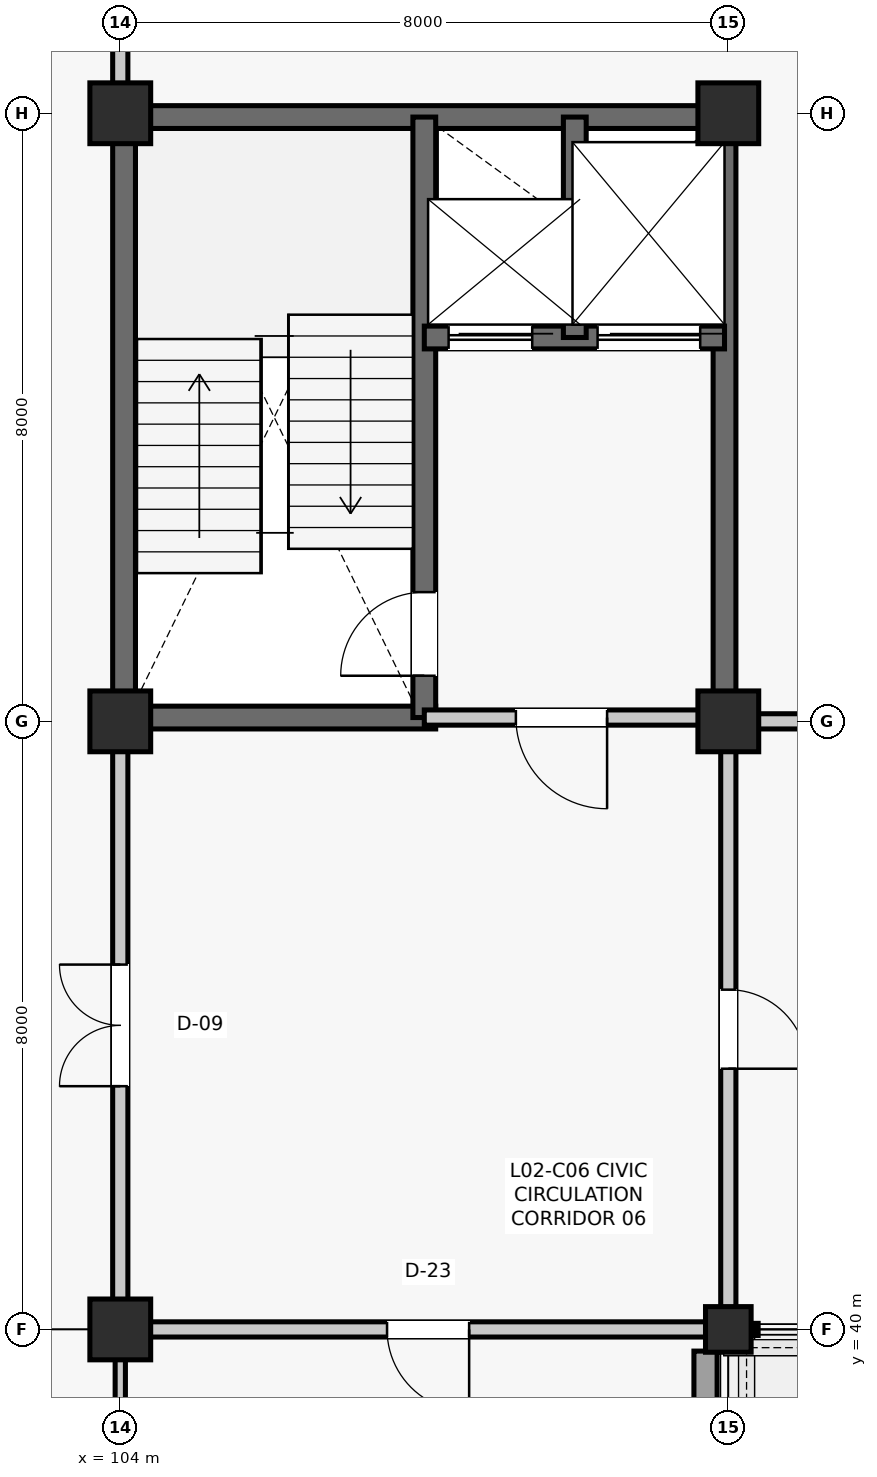
"""IFC4 building model, lengths in metres.
Left out: names, types, materials, properties, quantities, classifications, styles, units other than length and angle.
Written with IfcOpenShell. Run it as: python <this file> out.ifc"""

import sys

from ifc_helpers import new_model, si_unit, direction, frame, frame_2d, origin, origin_2d, place, context, subcontext, project, spatial, rectangle, extrude, element, fill, save


model = new_model("IFC4")
c1 = context("Model", 3, precision=1e-05, world=origin(), true_north=direction((0.0, 1.0)))
c2 = subcontext(c1, "Body", "Model", "MODEL_VIEW")
j1 = project(units=[si_unit("LENGTHUNIT", "METRE"), si_unit("PLANEANGLEUNIT", "RADIAN")], contexts=[c1])
p1 = place(None, origin())
s1 = spatial("IfcSite", under=j1, at=p1, CompositionType="ELEMENT")
p2 = place(p1, origin())
s2 = spatial("IfcBuilding", under=s1, at=p2, CompositionType="ELEMENT")
p3 = place(p2, frame((0.0, 0.0, 9.9)))
s3 = spatial("IfcBuildingStorey", under=s2, at=p3, CompositionType="ELEMENT", Elevation=9.9)
for number, where, z_axis, x_axis in (
    (1, (104.0, 40.0, 0.0), (0.0, 0.0, 1.0), (1.0, 0.0, 0.0)),
    (2, (104.0, 48.0, 0.0), (0.0, 0.0, 1.0), (1.0, 0.0, 0.0)),
    (3, (104.0, 56.0, 0.0), (0.0, 0.0, 1.0), (1.0, 0.0, 0.0)),
):
    element("IfcColumn", number, at=place(p3, frame(where, z_axis=z_axis, x_axis=x_axis)), inside=s3, PredefinedType="COLUMN", context=c2, shape_type="SweptSolid", body=[
        extrude(rectangle(XDim=0.8, YDim=0.8, at=origin_2d()), origin(), (0.0, 0.0, 1.0), 3.96),
    ])
p4 = place(p3, frame((112.0, 40.0, 0.0), z_axis=(0.0, 0.0, 1.0), x_axis=(1.0, 0.0, 0.0)))
e4 = element("IfcColumn", 4, at=p4, inside=s3, PredefinedType="COLUMN", context=c2, shape_type="SweptSolid", body=[
    extrude(rectangle(XDim=0.6, YDim=0.6, at=origin_2d()), origin(), (0.0, 0.0, 1.0), 3.96),
])
for number, where, z_axis, x_axis in (
    (5, (112.0, 48.0, 0.0), (0.0, 0.0, 1.0), (1.0, 0.0, 0.0)),
    (6, (112.0, 56.0, 0.0), (0.0, 0.0, 1.0), (1.0, 0.0, 0.0)),
):
    element("IfcColumn", number, at=place(p3, frame(where, z_axis=z_axis, x_axis=x_axis)), inside=s3, PredefinedType="COLUMN", context=c2, shape_type="SweptSolid", body=[
        extrude(rectangle(XDim=0.8, YDim=0.8, at=origin_2d()), origin(), (0.0, 0.0, 1.0), 3.96),
    ])
p5 = place(p3, frame((111.7, 32.285, 0.0), z_axis=(0.0, 0.0, 1.0), x_axis=(0.0, 1.0, 0.0)))
e7 = element("IfcWall", 7, at=p5, inside=s3, PredefinedType="SOLIDWALL", context=c2, shape_type="SweptSolid", body=[
    extrude(rectangle(XDim=7.43, YDim=0.305, at=frame_2d((3.715, 0.0))), origin(), (0.0, 0.0, 1.0), 3.28),
])
for number, where, z_axis, x_axis in (
    (8, (104.05, 48.29, 0.0), (0.0, 0.0, 1.0), (0.0, 1.0, 0.0)),
    (9, (104.29, 55.95, 0.0), (0.0, 0.0, 1.0), (1.0, 0.0, 0.0)),
    (10, (111.95, 48.29, 0.0), (0.0, 0.0, 1.0), (0.0, 1.0, 0.0)),
):
    element("IfcWall", number, at=place(p3, frame(where, z_axis=z_axis, x_axis=x_axis)), inside=s3, PredefinedType="SHEAR", context=c2, shape_type="SweptSolid", body=[
        extrude(rectangle(XDim=7.42, YDim=0.3, at=frame_2d((3.71, 0.0))), origin(), (0.0, 0.0, 1.0), 3.705),
    ])
p6 = place(p3, frame((104.29, 48.05, 0.0), z_axis=(0.0, 0.0, 1.0), x_axis=(1.0, 0.0, 0.0)))
e11 = element("IfcWall", 11, at=p6, inside=s3, PredefinedType="SHEAR", context=c2, shape_type="SweptSolid", body=[
    extrude(rectangle(XDim=3.86, YDim=0.3, at=frame_2d((1.93, 0.0))), origin(), (0.0, 0.0, 1.0), 3.705),
])
p7 = place(p3, frame((108.0, 48.05, 0.0), z_axis=(0.0, 0.0, 1.0), x_axis=(0.0, 1.0, 0.0)))
e12 = element("IfcWall", 12, at=p7, inside=s3, PredefinedType="SHEAR", context=c2, shape_type="SweptSolid", body=[
    extrude(rectangle(XDim=7.9, YDim=0.3, at=frame_2d((3.95, 0.0))), origin(), (0.0, 0.0, 1.0), 3.705),
])
p8 = place(p7, frame((0.55, 0.0, 0.0)))
e13 = element("IfcOpeningElement", 13, at=p8, cuts=e12, PredefinedType="OPENING", context=c2, shape_type="SweptSolid", body=[
    extrude(rectangle(XDim=1.1, YDim=2.15, at=frame_2d((0.55, 1.075))), frame((0.0, 0.16, 0.0), z_axis=(0.0, -1.0, 0.0), x_axis=(1.0, 0.0, 0.0)), (0.0, 0.0, 1.0), 0.32),
])
p9 = place(p3, frame((108.0, 53.05, 0.0), z_axis=(0.0, 0.0, 1.0), x_axis=(1.0, 0.0, 0.0)))
e14 = element("IfcWall", 14, at=p9, inside=s3, PredefinedType="SHEAR", context=c2, shape_type="SweptSolid", body=[
    extrude(rectangle(XDim=3.95, YDim=0.3, at=frame_2d((1.975, 0.0))), origin(), (0.0, 0.0, 1.0), 3.705),
])
p10 = place(p9, frame((0.32, 0.0, 0.0)))
e15 = element("IfcOpeningElement", 15, at=p10, cuts=e14, PredefinedType="OPENING", context=c2, shape_type="SweptSolid", body=[
    extrude(rectangle(XDim=1.1, YDim=2.2, at=frame_2d((0.55, 1.1))), frame((0.0, 0.16, 0.0), z_axis=(0.0, -1.0, 0.0), x_axis=(1.0, 0.0, 0.0)), (0.0, 0.0, 1.0), 0.32),
])
p11 = place(p9, frame((2.28, 0.0, 0.0)))
e16 = element("IfcOpeningElement", 16, at=p11, cuts=e14, PredefinedType="OPENING", context=c2, shape_type="SweptSolid", body=[
    extrude(rectangle(XDim=1.35, YDim=2.3, at=frame_2d((0.675, 1.15))), frame((0.0, 0.16, 0.0), z_axis=(0.0, -1.0, 0.0), x_axis=(1.0, 0.0, 0.0)), (0.0, 0.0, 1.0), 0.32),
])
p12 = place(p3, frame((109.98, 53.05, 0.0), z_axis=(0.0, 0.0, 1.0), x_axis=(0.0, 1.0, 0.0)))
e17 = element("IfcWall", 17, at=p12, inside=s3, PredefinedType="SHEAR", context=c2, shape_type="SweptSolid", body=[
    extrude(rectangle(XDim=2.9, YDim=0.3, at=frame_2d((1.45, 0.0))), origin(), (0.0, 0.0, 1.0), 3.705),
])
p13 = place(p3, frame((108.0, 48.05, 0.0), z_axis=(0.0, 0.0, 1.0), x_axis=(1.0, 0.0, 0.0)))
e18 = element("IfcWall", 18, at=p13, inside=s3, PredefinedType="PARTITIONING", context=c2, shape_type="SweptSolid", body=[
    extrude(rectangle(XDim=3.61, YDim=0.2, at=frame_2d((1.805, 0.0))), origin(), (0.0, 0.0, 1.0), 3.151),
])
p14 = place(p13, frame((1.205, 0.0, 0.0)))
e19 = element("IfcOpeningElement", 19, at=p14, cuts=e18, PredefinedType="OPENING", context=c2, shape_type="SweptSolid", body=[
    extrude(rectangle(XDim=1.2, YDim=2.15, at=frame_2d((0.6, 1.075))), frame((0.0, 0.11, 0.0), z_axis=(0.0, -1.0, 0.0), x_axis=(1.0, 0.0, 0.0)), (0.0, 0.0, 1.0), 0.22),
])
p15 = place(p3, frame((104.0, 32.39, 0.0), z_axis=(0.0, 0.0, 1.0), x_axis=(0.0, 1.0, 0.0)))
e20 = element("IfcWall", 20, at=p15, inside=s3, PredefinedType="PARTITIONING", context=c2, shape_type="SweptSolid", body=[
    extrude(rectangle(XDim=7.22, YDim=0.135, at=frame_2d((3.61, 0.0))), origin(), (0.0, 0.0, 1.0), 3.227),
])
p16 = place(p3, frame((104.0, 40.39, 0.0), z_axis=(0.0, 0.0, 1.0), x_axis=(0.0, 1.0, 0.0)))
e21 = element("IfcWall", 21, at=p16, inside=s3, PredefinedType="PARTITIONING", context=c2, shape_type="SweptSolid", body=[
    extrude(rectangle(XDim=7.22, YDim=0.2, at=frame_2d((3.61, 0.0))), origin(), (0.0, 0.0, 1.0), 3.151),
])
p17 = place(p16, frame((2.81, 0.0, 0.0)))
e22 = element("IfcOpeningElement", 22, at=p17, cuts=e21, PredefinedType="OPENING", context=c2, shape_type="SweptSolid", body=[
    extrude(rectangle(XDim=1.6, YDim=2.25, at=frame_2d((0.8, 1.125))), frame((0.0, 0.11, 0.0), z_axis=(0.0, -1.0, 0.0), x_axis=(1.0, 0.0, 0.0)), (0.0, 0.0, 1.0), 0.22),
])
p18 = place(p3, frame((104.0, 56.39, 0.0), z_axis=(0.0, 0.0, 1.0), x_axis=(0.0, 1.0, 0.0)))
e23 = element("IfcWall", 23, at=p18, inside=s3, PredefinedType="PARTITIONING", context=c2, shape_type="SweptSolid", body=[
    extrude(rectangle(XDim=7.22, YDim=0.2, at=frame_2d((3.61, 0.0))), origin(), (0.0, 0.0, 1.0), 3.157),
])
p19 = place(p18, frame((2.66, 0.0, 0.0)))
e24 = element("IfcOpeningElement", 24, at=p19, cuts=e23, PredefinedType="OPENING", context=c2, shape_type="SweptSolid", body=[
    extrude(rectangle(XDim=1.9, YDim=2.38, at=frame_2d((0.95, 1.19))), frame((0.0, 0.11, 0.0), z_axis=(0.0, -1.0, 0.0), x_axis=(1.0, 0.0, 0.0)), (0.0, 0.0, 1.0), 0.22),
])
p20 = place(p3, frame((104.39, 40.0, 0.0), z_axis=(0.0, 0.0, 1.0), x_axis=(1.0, 0.0, 0.0)))
e25 = element("IfcWall", 25, at=p20, inside=s3, PredefinedType="PARTITIONING", context=c2, shape_type="SweptSolid", body=[
    extrude(rectangle(XDim=7.32, YDim=0.2, at=frame_2d((3.66, 0.0))), origin(), (0.0, 0.0, 1.0), 3.141),
])
p21 = place(p20, frame((3.12, 0.0, 0.0)))
e26 = element("IfcOpeningElement", 26, at=p21, cuts=e25, PredefinedType="OPENING", context=c2, shape_type="SweptSolid", body=[
    extrude(rectangle(XDim=1.08, YDim=2.2, at=frame_2d((0.54, 1.1))), frame((0.0, 0.11, 0.0), z_axis=(0.0, -1.0, 0.0), x_axis=(1.0, 0.0, 0.0)), (0.0, 0.0, 1.0), 0.22),
])
p22 = place(p3, frame((112.0, 40.29, 0.0), z_axis=(0.0, 0.0, 1.0), x_axis=(0.0, 1.0, 0.0)))
e27 = element("IfcWall", 27, at=p22, inside=s3, PredefinedType="PARTITIONING", context=c2, shape_type="SweptSolid", body=[
    extrude(rectangle(XDim=7.32, YDim=0.2, at=frame_2d((3.66, 0.0))), origin(), (0.0, 0.0, 1.0), 3.221),
])
p23 = place(p22, frame((3.14, 0.0, 0.0)))
e28 = element("IfcOpeningElement", 28, at=p23, cuts=e27, PredefinedType="OPENING", context=c2, shape_type="SweptSolid", body=[
    extrude(rectangle(XDim=1.04, YDim=2.18, at=frame_2d((0.52, 1.09))), frame((0.0, 0.11, 0.0), z_axis=(0.0, -1.0, 0.0), x_axis=(1.0, 0.0, 0.0)), (0.0, 0.0, 1.0), 0.22),
])
p24 = place(p3, frame((112.39, 48.0, 0.0), z_axis=(0.0, 0.0, 1.0), x_axis=(1.0, 0.0, 0.0)))
e29 = element("IfcWall", 29, at=p24, inside=s3, PredefinedType="PARTITIONING", context=c2, shape_type="SweptSolid", body=[
    extrude(rectangle(XDim=7.32, YDim=0.2, at=frame_2d((3.66, 0.0))), origin(), (0.0, 0.0, 1.0), 3.082),
])
p25 = place(p24, frame((1.27, 0.0, 0.0)))
e30 = element("IfcOpeningElement", 30, at=p25, cuts=e29, PredefinedType="OPENING", context=c2, shape_type="SweptSolid", body=[
    extrude(rectangle(XDim=1.12, YDim=2.22, at=frame_2d((0.56, 1.11))), frame((0.0, 0.11, 0.0), z_axis=(0.0, -1.0, 0.0), x_axis=(1.0, 0.0, 0.0)), (0.0, 0.0, 1.0), 0.22),
])
p26 = place(p24, frame((5.296, 0.0, 0.0)))
e31 = element("IfcOpeningElement", 31, at=p26, cuts=e29, PredefinedType="OPENING", context=c2, shape_type="SweptSolid", body=[
    extrude(rectangle(XDim=1.12, YDim=2.22, at=frame_2d((0.56, 1.11))), frame((0.0, 0.11, 0.0), z_axis=(0.0, -1.0, 0.0), x_axis=(1.0, 0.0, 0.0)), (0.0, 0.0, 1.0), 0.22),
])
p27 = place(p8, origin())
e32 = element("IfcDoor", 32, at=p27, inside=s3, OperationType="SINGLE_SWING_LEFT", PredefinedType="DOOR", context=c2, shape_type="SweptSolid", body=[
    extrude(rectangle(XDim=1.1, YDim=2.15, at=frame_2d((0.55, 1.075))), frame((0.0, 0.025, 0.0), z_axis=(0.0, -1.0, 0.0), x_axis=(1.0, 0.0, 0.0)), (0.0, 0.0, 1.0), 0.05),
])
fill(e13, e32)
p28 = place(p10, origin())
e33 = element("IfcDoor", 33, at=p28, inside=s3, OperationType="SLIDING_TO_LEFT", PredefinedType="DOOR", context=c2, shape_type="SweptSolid", body=[
    extrude(rectangle(XDim=1.1, YDim=2.2, at=frame_2d((0.55, 1.1))), frame((0.0, 0.025, 0.0), z_axis=(0.0, -1.0, 0.0), x_axis=(1.0, 0.0, 0.0)), (0.0, 0.0, 1.0), 0.05),
])
fill(e15, e33)
p29 = place(p11, origin())
e34 = element("IfcDoor", 34, at=p29, inside=s3, OperationType="DOUBLE_DOOR_SLIDING", PredefinedType="DOOR", context=c2, shape_type="SweptSolid", body=[
    extrude(rectangle(XDim=1.35, YDim=2.3, at=frame_2d((0.675, 1.15))), frame((0.0, 0.025, 0.0), z_axis=(0.0, -1.0, 0.0), x_axis=(1.0, 0.0, 0.0)), (0.0, 0.0, 1.0), 0.05),
])
fill(e16, e34)
p30 = place(p14, frame((1.2, 0.0, 0.0), z_axis=(0.0, 0.0, 1.0), x_axis=(-1.0, 0.0, 0.0)))
e35 = element("IfcDoor", 35, at=p30, inside=s3, OperationType="SINGLE_SWING_RIGHT", PredefinedType="DOOR", context=c2, shape_type="SweptSolid", body=[
    extrude(rectangle(XDim=1.2, YDim=2.15, at=frame_2d((0.6, 1.075))), frame((0.0, 0.025, 0.0), z_axis=(0.0, -1.0, 0.0), x_axis=(1.0, 0.0, 0.0)), (0.0, 0.0, 1.0), 0.05),
])
fill(e19, e35)
p31 = place(p17, origin())
e36 = element("IfcDoor", 36, at=p31, inside=s3, OperationType="DOUBLE_DOOR_SINGLE_SWING", PredefinedType="DOOR", context=c2, shape_type="SweptSolid", body=[
    extrude(rectangle(XDim=1.6, YDim=2.25, at=frame_2d((0.8, 1.125))), frame((0.0, 0.025, 0.0), z_axis=(0.0, -1.0, 0.0), x_axis=(1.0, 0.0, 0.0)), (0.0, 0.0, 1.0), 0.05),
])
fill(e22, e36)
p32 = place(p21, frame((1.08, 0.0, 0.0), z_axis=(0.0, 0.0, 1.0), x_axis=(-1.0, 0.0, 0.0)))
e37 = element("IfcDoor", 37, at=p32, inside=s3, OperationType="SINGLE_SWING_RIGHT", PredefinedType="DOOR", context=c2, shape_type="SweptSolid", body=[
    extrude(rectangle(XDim=1.08, YDim=2.2, at=frame_2d((0.54, 1.1))), frame((0.0, 0.025, 0.0), z_axis=(0.0, -1.0, 0.0), x_axis=(1.0, 0.0, 0.0)), (0.0, 0.0, 1.0), 0.05),
])
fill(e26, e37)
p33 = place(p23, frame((1.04, 0.0, 0.0), z_axis=(0.0, 0.0, 1.0), x_axis=(-1.0, 0.0, 0.0)))
e38 = element("IfcDoor", 38, at=p33, inside=s3, OperationType="SINGLE_SWING_LEFT", PredefinedType="DOOR", context=c2, shape_type="SweptSolid", body=[
    extrude(rectangle(XDim=1.04, YDim=2.18, at=frame_2d((0.52, 1.09))), frame((0.0, 0.025, 0.0), z_axis=(0.0, -1.0, 0.0), x_axis=(1.0, 0.0, 0.0)), (0.0, 0.0, 1.0), 0.05),
])
fill(e28, e38)
save(model, sys.argv[1])
